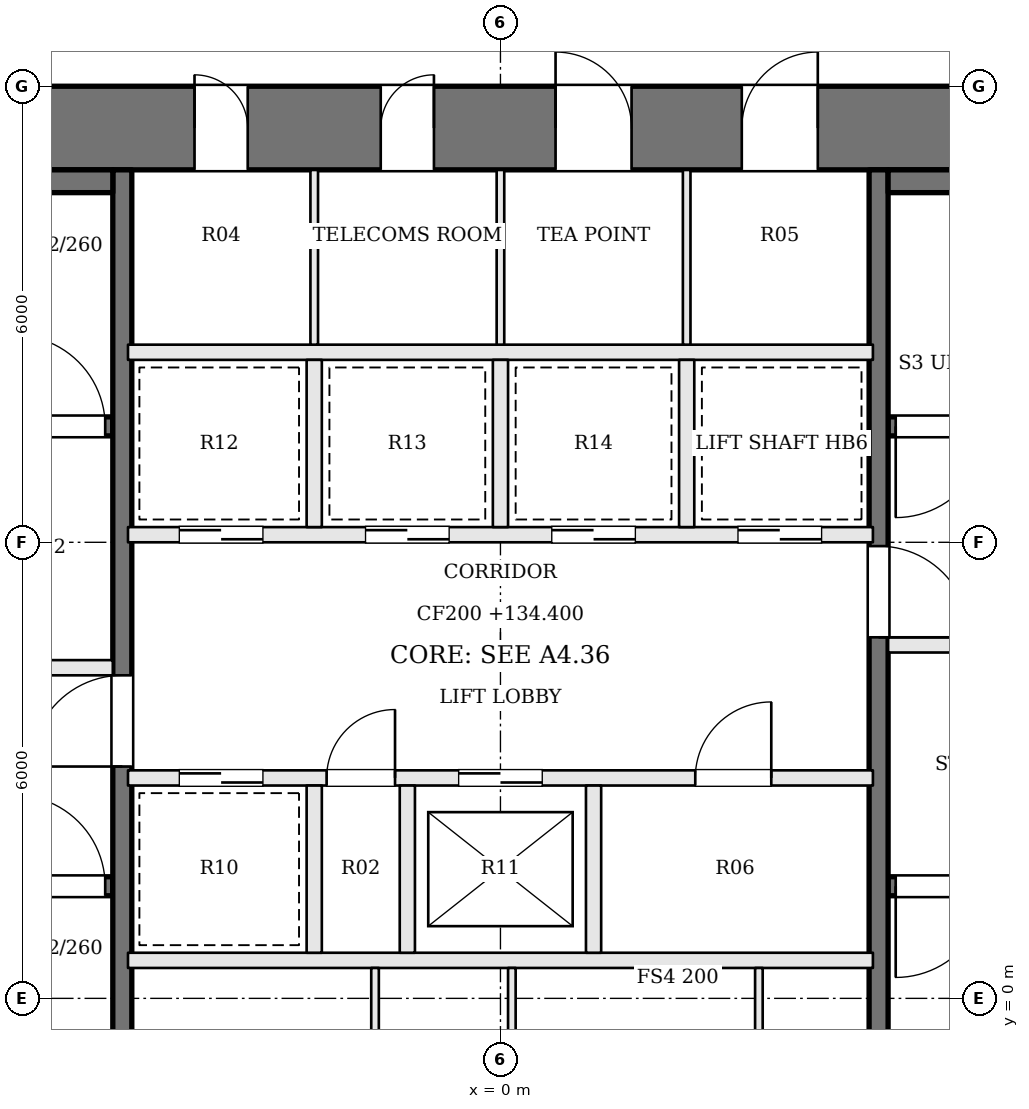
"""IFC4 building model, lengths in metres.
Left out: names, types, materials, properties, quantities, classifications, styles, units other than length and angle.
Written with IfcOpenShell. Run it as: python <this file> out.ifc"""

import sys

from ifc_helpers import new_model, si_unit, direction, frame, frame_2d, origin, place, context, subcontext, project, spatial, rectangle, extrude, element, fill, save


model = new_model("IFC4")
c1 = context("Model", 3, precision=1e-05, world=origin(), true_north=direction((0.0, 1.0)))
c2 = subcontext(c1, "Body", "Model", "MODEL_VIEW")
j1 = project(units=[si_unit("LENGTHUNIT", "METRE"), si_unit("PLANEANGLEUNIT", "RADIAN")], contexts=[c1])
p1 = place(None, origin())
s1 = spatial("IfcSite", under=j1, at=p1, CompositionType="ELEMENT")
p2 = place(p1, origin())
s2 = spatial("IfcBuilding", under=s1, at=p2, CompositionType="ELEMENT")
p3 = place(p2, frame((0.0, 0.0, 134.4)))
s3 = spatial("IfcBuildingStorey", under=s2, at=p3, CompositionType="ELEMENT", Elevation=134.4)
p4 = place(p3, frame((-13.0, 11.45, 0.0), z_axis=(0.0, 0.0, 1.0), x_axis=(1.0, 0.0, 0.0)))
e1 = element("IfcWall", 1, at=p4, inside=s3, PredefinedType="SHEAR", context=c2, shape_type="SweptSolid", body=[
    extrude(rectangle(XDim=26.0, YDim=1.1, at=frame_2d((13.0, 0.0))), origin(), (0.0, 0.0, 1.0), 3.9),
])
p5 = place(p4, frame((8.975, 0.0, 0.0)))
e2 = element("IfcOpeningElement", 2, at=p5, cuts=e1, PredefinedType="OPENING", context=c2, shape_type="SweptSolid", body=[
    extrude(rectangle(XDim=0.7, YDim=2.1, at=frame_2d((0.35, 1.05))), frame((0.0, 0.56, 0.0), z_axis=(0.0, -1.0, 0.0), x_axis=(1.0, 0.0, 0.0)), (0.0, 0.0, 1.0), 1.12),
])
p6 = place(p4, frame((11.425, 0.0, 0.0)))
e3 = element("IfcOpeningElement", 3, at=p6, cuts=e1, PredefinedType="OPENING", context=c2, shape_type="SweptSolid", body=[
    extrude(rectangle(XDim=0.7, YDim=2.1, at=frame_2d((0.35, 1.05))), frame((0.0, 0.56, 0.0), z_axis=(0.0, -1.0, 0.0), x_axis=(1.0, 0.0, 0.0)), (0.0, 0.0, 1.0), 1.12),
])
p7 = place(p4, frame((13.725, 0.0, 0.0)))
e4 = element("IfcOpeningElement", 4, at=p7, cuts=e1, PredefinedType="OPENING", context=c2, shape_type="SweptSolid", body=[
    extrude(rectangle(XDim=1.0, YDim=2.1, at=frame_2d((0.5, 1.05))), frame((0.0, 0.56, 0.0), z_axis=(0.0, -1.0, 0.0), x_axis=(1.0, 0.0, 0.0)), (0.0, 0.0, 1.0), 1.12),
])
p8 = place(p4, frame((16.175, 0.0, 0.0)))
e5 = element("IfcOpeningElement", 5, at=p8, cuts=e1, PredefinedType="OPENING", context=c2, shape_type="SweptSolid", body=[
    extrude(rectangle(XDim=1.0, YDim=2.1, at=frame_2d((0.5, 1.05))), frame((0.0, 0.56, 0.0), z_axis=(0.0, -1.0, 0.0), x_axis=(1.0, 0.0, 0.0)), (0.0, 0.0, 1.0), 1.12),
])
p9 = place(p3, frame((-11.9, 1.475, 0.0), z_axis=(0.0, 0.0, 1.0), x_axis=(1.0, 0.0, 0.0)))
e6 = element("IfcWall", 6, at=p9, inside=s3, PredefinedType="SOLIDWALL", context=c2, shape_type="SweptSolid", body=[
    extrude(rectangle(XDim=6.8, YDim=0.25, at=frame_2d((3.4, 0.0))), origin(), (0.0, 0.0, 1.0), 3.7),
])
p10 = place(p9, frame((5.5, 0.0, 0.0)))
e7 = element("IfcOpeningElement", 7, at=p10, cuts=e6, PredefinedType="OPENING", context=c2, shape_type="SweptSolid", body=[
    extrude(rectangle(XDim=1.2, YDim=2.1, at=frame_2d((0.6, 1.05))), frame((0.0, 0.135, 0.0), z_axis=(0.0, -1.0, 0.0), x_axis=(1.0, 0.0, 0.0)), (0.0, 0.0, 1.0), 0.27),
])
p11 = place(p3, frame((11.9, 7.525, 0.0), z_axis=(0.0, 0.0, 1.0), x_axis=(-1.0, 0.0, 0.0)))
e8 = element("IfcWall", 8, at=p11, inside=s3, PredefinedType="SOLIDWALL", context=c2, shape_type="SweptSolid", body=[
    extrude(rectangle(XDim=6.8, YDim=0.25, at=frame_2d((3.4, 0.0))), origin(), (0.0, 0.0, 1.0), 3.7),
])
p12 = place(p11, frame((5.5, 0.0, 0.0)))
e9 = element("IfcOpeningElement", 9, at=p12, cuts=e8, PredefinedType="OPENING", context=c2, shape_type="SweptSolid", body=[
    extrude(rectangle(XDim=1.2, YDim=2.1, at=frame_2d((0.6, 1.05))), frame((0.0, 0.135, 0.0), z_axis=(0.0, -1.0, 0.0), x_axis=(1.0, 0.0, 0.0)), (0.0, 0.0, 1.0), 0.27),
])
p13 = place(p3, frame((-11.9, 4.35, 0.0), z_axis=(0.0, 0.0, 1.0), x_axis=(1.0, 0.0, 0.0)))
e10 = element("IfcWall", 10, at=p13, inside=s3, PredefinedType="SOLIDWALL", context=c2, shape_type="SweptSolid", body=[
    extrude(rectangle(XDim=6.8, YDim=0.2, at=frame_2d((3.4, 0.0))), origin(), (0.0, 0.0, 1.0), 3.7),
])
p14 = place(p13, frame((4.1, 0.0, 0.0)))
e11 = element("IfcOpeningElement", 11, at=p14, cuts=e10, PredefinedType="OPENING", context=c2, shape_type="SweptSolid", body=[
    extrude(rectangle(XDim=1.2, YDim=2.1, at=frame_2d((0.6, 1.05))), frame((0.0, 0.11, 0.0), z_axis=(0.0, -1.0, 0.0), x_axis=(1.0, 0.0, 0.0)), (0.0, 0.0, 1.0), 0.22),
])
p15 = place(p13, frame((0.8, 0.0, 0.0)))
e12 = element("IfcOpeningElement", 12, at=p15, cuts=e10, PredefinedType="OPENING", context=c2, shape_type="SweptSolid", body=[
    extrude(rectangle(XDim=1.2, YDim=2.1, at=frame_2d((0.6, 1.05))), frame((0.0, 0.11, 0.0), z_axis=(0.0, -1.0, 0.0), x_axis=(1.0, 0.0, 0.0)), (0.0, 0.0, 1.0), 0.22),
])
p16 = place(p3, frame((11.9, 4.65, 0.0), z_axis=(0.0, 0.0, 1.0), x_axis=(-1.0, 0.0, 0.0)))
e13 = element("IfcWall", 13, at=p16, inside=s3, PredefinedType="SOLIDWALL", context=c2, shape_type="SweptSolid", body=[
    extrude(rectangle(XDim=6.8, YDim=0.2, at=frame_2d((3.4, 0.0))), origin(), (0.0, 0.0, 1.0), 3.7),
])
p17 = place(p16, frame((4.1, 0.0, 0.0)))
e14 = element("IfcOpeningElement", 14, at=p17, cuts=e13, PredefinedType="OPENING", context=c2, shape_type="SweptSolid", body=[
    extrude(rectangle(XDim=1.2, YDim=2.1, at=frame_2d((0.6, 1.05))), frame((0.0, 0.11, 0.0), z_axis=(0.0, -1.0, 0.0), x_axis=(1.0, 0.0, 0.0)), (0.0, 0.0, 1.0), 0.22),
])
p18 = place(p16, frame((0.8, 0.0, 0.0)))
e15 = element("IfcOpeningElement", 15, at=p18, cuts=e13, PredefinedType="OPENING", context=c2, shape_type="SweptSolid", body=[
    extrude(rectangle(XDim=1.2, YDim=2.1, at=frame_2d((0.6, 1.05))), frame((0.0, 0.11, 0.0), z_axis=(0.0, -1.0, 0.0), x_axis=(1.0, 0.0, 0.0)), (0.0, 0.0, 1.0), 0.22),
])
p19 = place(p3, frame((-11.9, 7.525, 0.0), z_axis=(0.0, 0.0, 1.0), x_axis=(1.0, 0.0, 0.0)))
e16 = element("IfcWall", 16, at=p19, inside=s3, PredefinedType="SOLIDWALL", context=c2, shape_type="SweptSolid", body=[
    extrude(rectangle(XDim=6.8, YDim=0.25, at=frame_2d((3.4, 0.0))), origin(), (0.0, 0.0, 1.0), 3.7),
])
p20 = place(p19, frame((5.5, 0.0, 0.0)))
e17 = element("IfcOpeningElement", 17, at=p20, cuts=e16, PredefinedType="OPENING", context=c2, shape_type="SweptSolid", body=[
    extrude(rectangle(XDim=1.2, YDim=2.1, at=frame_2d((0.6, 1.05))), frame((0.0, 0.135, 0.0), z_axis=(0.0, -1.0, 0.0), x_axis=(1.0, 0.0, 0.0)), (0.0, 0.0, 1.0), 0.27),
])
p21 = place(p3, frame((11.9, 1.475, 0.0), z_axis=(0.0, 0.0, 1.0), x_axis=(-1.0, 0.0, 0.0)))
e18 = element("IfcWall", 18, at=p21, inside=s3, PredefinedType="SOLIDWALL", context=c2, shape_type="SweptSolid", body=[
    extrude(rectangle(XDim=6.8, YDim=0.25, at=frame_2d((3.4, 0.0))), origin(), (0.0, 0.0, 1.0), 3.7),
])
p22 = place(p21, frame((5.5, 0.0, 0.0)))
e19 = element("IfcOpeningElement", 19, at=p22, cuts=e18, PredefinedType="OPENING", context=c2, shape_type="SweptSolid", body=[
    extrude(rectangle(XDim=1.2, YDim=2.1, at=frame_2d((0.6, 1.05))), frame((0.0, 0.135, 0.0), z_axis=(0.0, -1.0, 0.0), x_axis=(1.0, 0.0, 0.0)), (0.0, 0.0, 1.0), 0.27),
])
p23 = place(p3, frame((-4.975, -1.9, 0.0), z_axis=(0.0, 0.0, 1.0), x_axis=(0.0, 1.0, 0.0)))
e20 = element("IfcWall", 20, at=p23, inside=s3, PredefinedType="SOLIDWALL", context=c2, shape_type="SweptSolid", body=[
    extrude(rectangle(XDim=12.8, YDim=0.25, at=frame_2d((6.4, 0.0))), origin(), (0.0, 0.0, 1.0), 3.7),
])
p24 = place(p23, frame((4.95, 0.0, 0.0)))
e21 = element("IfcOpeningElement", 21, at=p24, cuts=e20, PredefinedType="OPENING", context=c2, shape_type="SweptSolid", body=[
    extrude(rectangle(XDim=1.2, YDim=2.1, at=frame_2d((0.6, 1.05))), frame((0.0, 0.135, 0.0), z_axis=(0.0, -1.0, 0.0), x_axis=(1.0, 0.0, 0.0)), (0.0, 0.0, 1.0), 0.27),
])
p25 = place(p3, frame((4.975, 10.9, 0.0), z_axis=(0.0, 0.0, 1.0), x_axis=(0.0, -1.0, 0.0)))
e22 = element("IfcWall", 22, at=p25, inside=s3, PredefinedType="SOLIDWALL", context=c2, shape_type="SweptSolid", body=[
    extrude(rectangle(XDim=12.8, YDim=0.25, at=frame_2d((6.4, 0.0))), origin(), (0.0, 0.0, 1.0), 3.7),
])
p26 = place(p25, frame((4.95, 0.0, 0.0)))
e23 = element("IfcOpeningElement", 23, at=p26, cuts=e22, PredefinedType="OPENING", context=c2, shape_type="SweptSolid", body=[
    extrude(rectangle(XDim=1.2, YDim=2.1, at=frame_2d((0.6, 1.05))), frame((0.0, 0.135, 0.0), z_axis=(0.0, -1.0, 0.0), x_axis=(1.0, 0.0, 0.0)), (0.0, 0.0, 1.0), 0.27),
])
for number, where, z_axis, x_axis in (
    (24, (-11.9, 10.75, 0.0), (0.0, 0.0, 1.0), (1.0, 0.0, 0.0)),
    (25, (11.9, 10.75, 0.0), (0.0, 0.0, 1.0), (-1.0, 0.0, 0.0)),
):
    element("IfcWall", number, at=place(p3, frame(where, z_axis=z_axis, x_axis=x_axis)), inside=s3, PredefinedType="SOLIDWALL", context=c2, shape_type="SweptSolid", body=[
        extrude(rectangle(XDim=6.8, YDim=0.3, at=frame_2d((3.4, 0.0))), origin(), (0.0, 0.0, 1.0), 3.7),
    ])
p27 = place(p3, frame((-4.9, 0.5, 0.0), z_axis=(0.0, 0.0, 1.0), x_axis=(1.0, 0.0, 0.0)))
e26 = element("IfcWall", 26, at=p27, inside=s3, PredefinedType="SOLIDWALL", context=c2, shape_type="SweptSolid", body=[
    extrude(rectangle(XDim=9.8, YDim=0.2, at=frame_2d((4.9, 0.0))), origin(), (0.0, 0.0, 1.0), 3.7),
])
p28 = place(p3, frame((-4.9, 2.9, 0.0), z_axis=(0.0, 0.0, 1.0), x_axis=(1.0, 0.0, 0.0)))
e27 = element("IfcWall", 27, at=p28, inside=s3, PredefinedType="SOLIDWALL", context=c2, shape_type="SweptSolid", body=[
    extrude(rectangle(XDim=9.8, YDim=0.2, at=frame_2d((4.9, 0.0))), origin(), (0.0, 0.0, 1.0), 3.7),
])
p29 = place(p28, frame((0.675, 0.0, 0.0)))
e28 = element("IfcOpeningElement", 28, at=p29, cuts=e27, PredefinedType="OPENING", context=c2, shape_type="SweptSolid", body=[
    extrude(rectangle(XDim=1.1, YDim=2.1, at=frame_2d((0.55, 1.05))), frame((0.0, 0.11, 0.0), z_axis=(0.0, -1.0, 0.0), x_axis=(1.0, 0.0, 0.0)), (0.0, 0.0, 1.0), 0.22),
])
p30 = place(p28, frame((2.613, 0.0, 0.0)))
e29 = element("IfcOpeningElement", 29, at=p30, cuts=e27, PredefinedType="OPENING", context=c2, shape_type="SweptSolid", body=[
    extrude(rectangle(XDim=0.9, YDim=2.1, at=frame_2d((0.45, 1.05))), frame((0.0, 0.11, 0.0), z_axis=(0.0, -1.0, 0.0), x_axis=(1.0, 0.0, 0.0)), (0.0, 0.0, 1.0), 0.22),
])
p31 = place(p28, frame((4.35, 0.0, 0.0)))
e30 = element("IfcOpeningElement", 30, at=p31, cuts=e27, PredefinedType="OPENING", context=c2, shape_type="SweptSolid", body=[
    extrude(rectangle(XDim=1.1, YDim=2.1, at=frame_2d((0.55, 1.05))), frame((0.0, 0.11, 0.0), z_axis=(0.0, -1.0, 0.0), x_axis=(1.0, 0.0, 0.0)), (0.0, 0.0, 1.0), 0.22),
])
p32 = place(p28, frame((7.463, 0.0, 0.0)))
e31 = element("IfcOpeningElement", 31, at=p32, cuts=e27, PredefinedType="OPENING", context=c2, shape_type="SweptSolid", body=[
    extrude(rectangle(XDim=1.0, YDim=2.1, at=frame_2d((0.5, 1.05))), frame((0.0, 0.11, 0.0), z_axis=(0.0, -1.0, 0.0), x_axis=(1.0, 0.0, 0.0)), (0.0, 0.0, 1.0), 0.22),
])
p33 = place(p3, frame((-4.9, 6.1, 0.0), z_axis=(0.0, 0.0, 1.0), x_axis=(1.0, 0.0, 0.0)))
e32 = element("IfcWall", 32, at=p33, inside=s3, PredefinedType="SOLIDWALL", context=c2, shape_type="SweptSolid", body=[
    extrude(rectangle(XDim=9.8, YDim=0.2, at=frame_2d((4.9, 0.0))), origin(), (0.0, 0.0, 1.0), 3.7),
])
p34 = place(p33, frame((0.675, 0.0, 0.0)))
e33 = element("IfcOpeningElement", 33, at=p34, cuts=e32, PredefinedType="OPENING", context=c2, shape_type="SweptSolid", body=[
    extrude(rectangle(XDim=1.1, YDim=2.1, at=frame_2d((0.55, 1.05))), frame((0.0, 0.11, 0.0), z_axis=(0.0, -1.0, 0.0), x_axis=(1.0, 0.0, 0.0)), (0.0, 0.0, 1.0), 0.22),
])
p35 = place(p33, frame((3.125, 0.0, 0.0)))
e34 = element("IfcOpeningElement", 34, at=p35, cuts=e32, PredefinedType="OPENING", context=c2, shape_type="SweptSolid", body=[
    extrude(rectangle(XDim=1.1, YDim=2.1, at=frame_2d((0.55, 1.05))), frame((0.0, 0.11, 0.0), z_axis=(0.0, -1.0, 0.0), x_axis=(1.0, 0.0, 0.0)), (0.0, 0.0, 1.0), 0.22),
])
p36 = place(p33, frame((5.575, 0.0, 0.0)))
e35 = element("IfcOpeningElement", 35, at=p36, cuts=e32, PredefinedType="OPENING", context=c2, shape_type="SweptSolid", body=[
    extrude(rectangle(XDim=1.1, YDim=2.1, at=frame_2d((0.55, 1.05))), frame((0.0, 0.11, 0.0), z_axis=(0.0, -1.0, 0.0), x_axis=(1.0, 0.0, 0.0)), (0.0, 0.0, 1.0), 0.22),
])
p37 = place(p33, frame((8.025, 0.0, 0.0)))
e36 = element("IfcOpeningElement", 36, at=p37, cuts=e32, PredefinedType="OPENING", context=c2, shape_type="SweptSolid", body=[
    extrude(rectangle(XDim=1.1, YDim=2.1, at=frame_2d((0.55, 1.05))), frame((0.0, 0.11, 0.0), z_axis=(0.0, -1.0, 0.0), x_axis=(1.0, 0.0, 0.0)), (0.0, 0.0, 1.0), 0.22),
])
p38 = place(p3, frame((-4.9, 8.5, 0.0), z_axis=(0.0, 0.0, 1.0), x_axis=(1.0, 0.0, 0.0)))
e37 = element("IfcWall", 37, at=p38, inside=s3, PredefinedType="SOLIDWALL", context=c2, shape_type="SweptSolid", body=[
    extrude(rectangle(XDim=9.8, YDim=0.2, at=frame_2d((4.9, 0.0))), origin(), (0.0, 0.0, 1.0), 3.7),
])
for number, where, z_axis, x_axis in (
    (38, (-2.45, 0.6, 0.0), (0.0, 0.0, 1.0), (0.0, 1.0, 0.0)),
    (39, (-1.225, 0.6, 0.0), (0.0, 0.0, 1.0), (0.0, 1.0, 0.0)),
    (40, (1.225, 0.6, 0.0), (0.0, 0.0, 1.0), (0.0, 1.0, 0.0)),
    (41, (-2.45, 6.2, 0.0), (0.0, 0.0, 1.0), (0.0, 1.0, 0.0)),
    (42, (0.0, 6.2, 0.0), (0.0, 0.0, 1.0), (0.0, 1.0, 0.0)),
    (43, (2.45, 6.2, 0.0), (0.0, 0.0, 1.0), (0.0, 1.0, 0.0)),
):
    element("IfcWall", number, at=place(p3, frame(where, z_axis=z_axis, x_axis=x_axis)), inside=s3, PredefinedType="SOLIDWALL", context=c2, shape_type="SweptSolid", body=[
        extrude(rectangle(XDim=2.2, YDim=0.2, at=frame_2d((1.1, 0.0))), origin(), (0.0, 0.0, 1.0), 3.7),
    ])
for number, where, z_axis, x_axis in (
    (44, (-1.65, -1.9, 0.0), (0.0, 0.0, 1.0), (0.0, 1.0, 0.0)),
    (45, (0.15, -1.9, 0.0), (0.0, 0.0, 1.0), (0.0, 1.0, 0.0)),
    (46, (3.4, -1.9, 0.0), (0.0, 0.0, 1.0), (0.0, 1.0, 0.0)),
    (47, (-2.45, 8.6, 0.0), (0.0, 0.0, 1.0), (0.0, 1.0, 0.0)),
    (48, (0.0, 8.6, 0.0), (0.0, 0.0, 1.0), (0.0, 1.0, 0.0)),
    (49, (2.45, 8.6, 0.0), (0.0, 0.0, 1.0), (0.0, 1.0, 0.0)),
):
    element("IfcWall", number, at=place(p3, frame(where, z_axis=z_axis, x_axis=x_axis)), inside=s3, PredefinedType="PARTITIONING", context=c2, shape_type="SweptSolid", body=[
        extrude(rectangle(XDim=2.3, YDim=0.1, at=frame_2d((1.15, 0.0))), origin(), (0.0, 0.0, 1.0), 3.7),
    ])
p39 = place(p24, origin())
e50 = element("IfcDoor", 50, at=p39, inside=s3, OperationType="SINGLE_SWING_LEFT", PredefinedType="DOOR", context=c2, shape_type="SweptSolid", body=[
    extrude(rectangle(XDim=1.2, YDim=2.1, at=frame_2d((0.6, 1.05))), frame((0.0, 0.025, 0.0), z_axis=(0.0, -1.0, 0.0), x_axis=(1.0, 0.0, 0.0)), (0.0, 0.0, 1.0), 0.05),
])
fill(e21, e50)
p40 = place(p26, origin())
e51 = element("IfcDoor", 51, at=p40, inside=s3, OperationType="SINGLE_SWING_RIGHT", PredefinedType="DOOR", context=c2, shape_type="SweptSolid", body=[
    extrude(rectangle(XDim=1.2, YDim=2.1, at=frame_2d((0.6, 1.05))), frame((0.0, 0.025, 0.0), z_axis=(0.0, -1.0, 0.0), x_axis=(1.0, 0.0, 0.0)), (0.0, 0.0, 1.0), 0.05),
])
fill(e23, e51)
p41 = place(p10, origin())
e52 = element("IfcDoor", 52, at=p41, inside=s3, OperationType="SINGLE_SWING_LEFT", PredefinedType="DOOR", context=c2, shape_type="SweptSolid", body=[
    extrude(rectangle(XDim=1.2, YDim=2.1, at=frame_2d((0.6, 1.05))), frame((0.0, 0.025, 0.0), z_axis=(0.0, -1.0, 0.0), x_axis=(1.0, 0.0, 0.0)), (0.0, 0.0, 1.0), 0.05),
])
fill(e7, e52)
p42 = place(p12, origin())
e53 = element("IfcDoor", 53, at=p42, inside=s3, OperationType="SINGLE_SWING_RIGHT", PredefinedType="DOOR", context=c2, shape_type="SweptSolid", body=[
    extrude(rectangle(XDim=1.2, YDim=2.1, at=frame_2d((0.6, 1.05))), frame((0.0, 0.025, 0.0), z_axis=(0.0, -1.0, 0.0), x_axis=(1.0, 0.0, 0.0)), (0.0, 0.0, 1.0), 0.05),
])
fill(e9, e53)
p43 = place(p20, origin())
e54 = element("IfcDoor", 54, at=p43, inside=s3, OperationType="SINGLE_SWING_LEFT", PredefinedType="DOOR", context=c2, shape_type="SweptSolid", body=[
    extrude(rectangle(XDim=1.2, YDim=2.1, at=frame_2d((0.6, 1.05))), frame((0.0, 0.025, 0.0), z_axis=(0.0, -1.0, 0.0), x_axis=(1.0, 0.0, 0.0)), (0.0, 0.0, 1.0), 0.05),
])
fill(e17, e54)
p44 = place(p22, origin())
e55 = element("IfcDoor", 55, at=p44, inside=s3, OperationType="SINGLE_SWING_RIGHT", PredefinedType="DOOR", context=c2, shape_type="SweptSolid", body=[
    extrude(rectangle(XDim=1.2, YDim=2.1, at=frame_2d((0.6, 1.05))), frame((0.0, 0.025, 0.0), z_axis=(0.0, -1.0, 0.0), x_axis=(1.0, 0.0, 0.0)), (0.0, 0.0, 1.0), 0.05),
])
fill(e19, e55)
p45 = place(p29, origin())
e56 = element("IfcDoor", 56, at=p45, inside=s3, OperationType="SLIDING_TO_RIGHT", PredefinedType="DOOR", context=c2, shape_type="SweptSolid", body=[
    extrude(rectangle(XDim=1.1, YDim=2.1, at=frame_2d((0.55, 1.05))), frame((0.0, 0.025, 0.0), z_axis=(0.0, -1.0, 0.0), x_axis=(1.0, 0.0, 0.0)), (0.0, 0.0, 1.0), 0.05),
])
fill(e28, e56)
p46 = place(p30, origin())
e57 = element("IfcDoor", 57, at=p46, inside=s3, OperationType="SINGLE_SWING_RIGHT", PredefinedType="DOOR", context=c2, shape_type="SweptSolid", body=[
    extrude(rectangle(XDim=0.9, YDim=2.1, at=frame_2d((0.45, 1.05))), frame((0.0, 0.025, 0.0), z_axis=(0.0, -1.0, 0.0), x_axis=(1.0, 0.0, 0.0)), (0.0, 0.0, 1.0), 0.05),
])
fill(e29, e57)
p47 = place(p31, origin())
e58 = element("IfcDoor", 58, at=p47, inside=s3, OperationType="SLIDING_TO_LEFT", PredefinedType="DOOR", context=c2, shape_type="SweptSolid", body=[
    extrude(rectangle(XDim=1.1, YDim=2.1, at=frame_2d((0.55, 1.05))), frame((0.0, 0.025, 0.0), z_axis=(0.0, -1.0, 0.0), x_axis=(1.0, 0.0, 0.0)), (0.0, 0.0, 1.0), 0.05),
])
fill(e30, e58)
p48 = place(p32, origin())
e59 = element("IfcDoor", 59, at=p48, inside=s3, OperationType="SINGLE_SWING_RIGHT", PredefinedType="DOOR", context=c2, shape_type="SweptSolid", body=[
    extrude(rectangle(XDim=1.0, YDim=2.1, at=frame_2d((0.5, 1.05))), frame((0.0, 0.025, 0.0), z_axis=(0.0, -1.0, 0.0), x_axis=(1.0, 0.0, 0.0)), (0.0, 0.0, 1.0), 0.05),
])
fill(e31, e59)
p49 = place(p34, origin())
e60 = element("IfcDoor", 60, at=p49, inside=s3, OperationType="SLIDING_TO_RIGHT", PredefinedType="DOOR", context=c2, shape_type="SweptSolid", body=[
    extrude(rectangle(XDim=1.1, YDim=2.1, at=frame_2d((0.55, 1.05))), frame((0.0, 0.025, 0.0), z_axis=(0.0, -1.0, 0.0), x_axis=(1.0, 0.0, 0.0)), (0.0, 0.0, 1.0), 0.05),
])
fill(e33, e60)
p50 = place(p35, origin())
e61 = element("IfcDoor", 61, at=p50, inside=s3, OperationType="SLIDING_TO_LEFT", PredefinedType="DOOR", context=c2, shape_type="SweptSolid", body=[
    extrude(rectangle(XDim=1.1, YDim=2.1, at=frame_2d((0.55, 1.05))), frame((0.0, 0.025, 0.0), z_axis=(0.0, -1.0, 0.0), x_axis=(1.0, 0.0, 0.0)), (0.0, 0.0, 1.0), 0.05),
])
fill(e34, e61)
p51 = place(p36, origin())
e62 = element("IfcDoor", 62, at=p51, inside=s3, OperationType="SLIDING_TO_RIGHT", PredefinedType="DOOR", context=c2, shape_type="SweptSolid", body=[
    extrude(rectangle(XDim=1.1, YDim=2.1, at=frame_2d((0.55, 1.05))), frame((0.0, 0.025, 0.0), z_axis=(0.0, -1.0, 0.0), x_axis=(1.0, 0.0, 0.0)), (0.0, 0.0, 1.0), 0.05),
])
fill(e35, e62)
p52 = place(p37, origin())
e63 = element("IfcDoor", 63, at=p52, inside=s3, OperationType="SLIDING_TO_LEFT", PredefinedType="DOOR", context=c2, shape_type="SweptSolid", body=[
    extrude(rectangle(XDim=1.1, YDim=2.1, at=frame_2d((0.55, 1.05))), frame((0.0, 0.025, 0.0), z_axis=(0.0, -1.0, 0.0), x_axis=(1.0, 0.0, 0.0)), (0.0, 0.0, 1.0), 0.05),
])
fill(e36, e63)
p53 = place(p5, origin())
e64 = element("IfcDoor", 64, at=p53, inside=s3, OperationType="SINGLE_SWING_LEFT", PredefinedType="DOOR", context=c2, shape_type="SweptSolid", body=[
    extrude(rectangle(XDim=0.7, YDim=2.1, at=frame_2d((0.35, 1.05))), frame((0.0, 0.025, 0.0), z_axis=(0.0, -1.0, 0.0), x_axis=(1.0, 0.0, 0.0)), (0.0, 0.0, 1.0), 0.05),
])
fill(e2, e64)
p54 = place(p6, origin())
e65 = element("IfcDoor", 65, at=p54, inside=s3, OperationType="SINGLE_SWING_RIGHT", PredefinedType="DOOR", context=c2, shape_type="SweptSolid", body=[
    extrude(rectangle(XDim=0.7, YDim=2.1, at=frame_2d((0.35, 1.05))), frame((0.0, 0.025, 0.0), z_axis=(0.0, -1.0, 0.0), x_axis=(1.0, 0.0, 0.0)), (0.0, 0.0, 1.0), 0.05),
])
fill(e3, e65)
p55 = place(p7, origin())
e66 = element("IfcDoor", 66, at=p55, inside=s3, OperationType="SINGLE_SWING_LEFT", PredefinedType="DOOR", context=c2, shape_type="SweptSolid", body=[
    extrude(rectangle(XDim=1.0, YDim=2.1, at=frame_2d((0.5, 1.05))), frame((0.0, 0.025, 0.0), z_axis=(0.0, -1.0, 0.0), x_axis=(1.0, 0.0, 0.0)), (0.0, 0.0, 1.0), 0.05),
])
fill(e4, e66)
p56 = place(p8, origin())
e67 = element("IfcDoor", 67, at=p56, inside=s3, OperationType="SINGLE_SWING_RIGHT", PredefinedType="DOOR", context=c2, shape_type="SweptSolid", body=[
    extrude(rectangle(XDim=1.0, YDim=2.1, at=frame_2d((0.5, 1.05))), frame((0.0, 0.025, 0.0), z_axis=(0.0, -1.0, 0.0), x_axis=(1.0, 0.0, 0.0)), (0.0, 0.0, 1.0), 0.05),
])
fill(e5, e67)
save(model, sys.argv[1])
